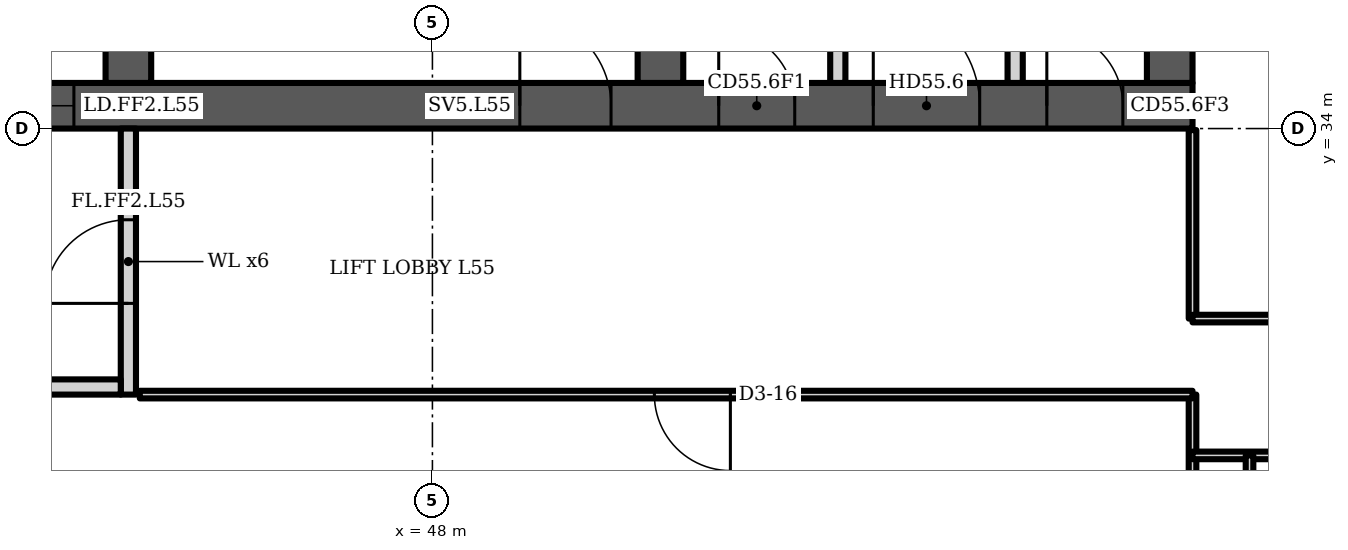
"""IFC4 building model, lengths in metres.
Left out: names, types, materials, properties, quantities, classifications, styles, units other than length and angle.
Written with IfcOpenShell. Run it as: python <this file> out.ifc"""

import sys

from ifc_helpers import new_model, si_unit, direction, frame, frame_2d, origin, place, context, subcontext, project, spatial, polyline, rectangle, outline, extrude, element, fill, save


model = new_model("IFC4")
c1 = context("Model", 3, precision=1e-05, world=origin(), true_north=direction((0.0, 1.0)))
c2 = subcontext(c1, "Body", "Model", "MODEL_VIEW")
j1 = project(units=[si_unit("LENGTHUNIT", "METRE"), si_unit("PLANEANGLEUNIT", "RADIAN")], contexts=[c1])
p1 = place(None, origin())
s1 = spatial("IfcSite", under=j1, at=p1, CompositionType="ELEMENT")
p2 = place(p1, origin())
s2 = spatial("IfcBuilding", under=s1, at=p2, CompositionType="ELEMENT")
p3 = place(p2, frame((0.0, 0.0, 221.5)))
s3 = spatial("IfcBuildingStorey", under=s2, at=p3, CompositionType="ELEMENT", Elevation=221.5)
p4 = place(p3, frame((23.0, 34.3, 0.0), z_axis=(0.0, 0.0, 1.0), x_axis=(1.0, 0.0, 0.0)))
e1 = element("IfcWall", 1, at=p4, inside=s3, PredefinedType="SHEAR", context=c2, shape_type="SweptSolid", body=[
    extrude(rectangle(XDim=35.0, YDim=0.6, at=frame_2d((17.5, 0.0))), origin(), (0.0, 0.0, 1.0), 3.6),
])
p5 = place(p4, frame((0.65, 0.0, 0.0)))
e2 = element("IfcOpeningElement", 2, at=p5, cuts=e1, PredefinedType="OPENING", context=c2, shape_type="SweptSolid", body=[
    extrude(rectangle(XDim=1.2, YDim=2.1, at=frame_2d((0.6, 1.05))), frame((0.0, 0.31, 0.0), z_axis=(0.0, -1.0, 0.0), x_axis=(1.0, 0.0, 0.0)), (0.0, 0.0, 1.0), 0.62),
])
p6 = place(p4, frame((7.717, 0.0, 0.0)))
e3 = element("IfcOpeningElement", 3, at=p6, cuts=e1, PredefinedType="OPENING", context=c2, shape_type="SweptSolid", body=[
    extrude(rectangle(XDim=1.1, YDim=2.1, at=frame_2d((0.55, 1.05))), frame((0.0, 0.31, 0.0), z_axis=(0.0, -1.0, 0.0), x_axis=(1.0, 0.0, 0.0)), (0.0, 0.0, 1.0), 0.62),
])
p7 = place(p4, frame((12.183, 0.0, 0.0)))
e4 = element("IfcOpeningElement", 4, at=p7, cuts=e1, PredefinedType="OPENING", context=c2, shape_type="SweptSolid", body=[
    extrude(rectangle(XDim=1.1, YDim=2.1, at=frame_2d((0.55, 1.05))), frame((0.0, 0.31, 0.0), z_axis=(0.0, -1.0, 0.0), x_axis=(1.0, 0.0, 0.0)), (0.0, 0.0, 1.0), 0.62),
])
p8 = place(p4, frame((9.8, 0.0, 0.0)))
e5 = element("IfcOpeningElement", 5, at=p8, cuts=e1, PredefinedType="OPENING", context=c2, shape_type="SweptSolid", body=[
    extrude(rectangle(XDim=1.4, YDim=2.1, at=frame_2d((0.7, 1.05))), frame((0.0, 0.31, 0.0), z_axis=(0.0, -1.0, 0.0), x_axis=(1.0, 0.0, 0.0)), (0.0, 0.0, 1.0), 0.62),
])
p9 = place(p4, frame((14.717, 0.0, 0.0)))
e6 = element("IfcOpeningElement", 6, at=p9, cuts=e1, PredefinedType="OPENING", context=c2, shape_type="SweptSolid", body=[
    extrude(rectangle(XDim=1.1, YDim=2.1, at=frame_2d((0.55, 1.05))), frame((0.0, 0.31, 0.0), z_axis=(0.0, -1.0, 0.0), x_axis=(1.0, 0.0, 0.0)), (0.0, 0.0, 1.0), 0.62),
])
p10 = place(p4, frame((16.95, 0.0, 0.0)))
e7 = element("IfcOpeningElement", 7, at=p10, cuts=e1, PredefinedType="OPENING", context=c2, shape_type="SweptSolid", body=[
    extrude(rectangle(XDim=1.1, YDim=2.1, at=frame_2d((0.55, 1.05))), frame((0.0, 0.31, 0.0), z_axis=(0.0, -1.0, 0.0), x_axis=(1.0, 0.0, 0.0)), (0.0, 0.0, 1.0), 0.62),
])
p11 = place(p4, frame((19.183, 0.0, 0.0)))
e8 = element("IfcOpeningElement", 8, at=p11, cuts=e1, PredefinedType="OPENING", context=c2, shape_type="SweptSolid", body=[
    extrude(rectangle(XDim=1.1, YDim=2.1, at=frame_2d((0.55, 1.05))), frame((0.0, 0.31, 0.0), z_axis=(0.0, -1.0, 0.0), x_axis=(1.0, 0.0, 0.0)), (0.0, 0.0, 1.0), 0.62),
])
p12 = place(p4, frame((26.15, 0.0, 0.0)))
e9 = element("IfcOpeningElement", 9, at=p12, cuts=e1, PredefinedType="OPENING", context=c2, shape_type="SweptSolid", body=[
    extrude(rectangle(XDim=1.2, YDim=2.1, at=frame_2d((0.6, 1.05))), frame((0.0, 0.31, 0.0), z_axis=(0.0, -1.0, 0.0), x_axis=(1.0, 0.0, 0.0)), (0.0, 0.0, 1.0), 0.62),
])
p13 = place(p4, frame((28.767, 0.0, 0.0)))
e10 = element("IfcOpeningElement", 10, at=p13, cuts=e1, PredefinedType="OPENING", context=c2, shape_type="SweptSolid", body=[
    extrude(rectangle(XDim=1.0, YDim=2.1, at=frame_2d((0.5, 1.05))), frame((0.0, 0.31, 0.0), z_axis=(0.0, -1.0, 0.0), x_axis=(1.0, 0.0, 0.0)), (0.0, 0.0, 1.0), 0.62),
])
p14 = place(p4, frame((33.083, 0.0, 0.0)))
e11 = element("IfcOpeningElement", 11, at=p14, cuts=e1, PredefinedType="OPENING", context=c2, shape_type="SweptSolid", body=[
    extrude(rectangle(XDim=1.0, YDim=2.1, at=frame_2d((0.5, 1.05))), frame((0.0, 0.31, 0.0), z_axis=(0.0, -1.0, 0.0), x_axis=(1.0, 0.0, 0.0)), (0.0, 0.0, 1.0), 0.62),
])
p15 = place(p4, frame((30.8, 0.0, 0.0)))
e12 = element("IfcOpeningElement", 12, at=p15, cuts=e1, PredefinedType="OPENING", context=c2, shape_type="SweptSolid", body=[
    extrude(rectangle(XDim=1.4, YDim=2.1, at=frame_2d((0.7, 1.05))), frame((0.0, 0.31, 0.0), z_axis=(0.0, -1.0, 0.0), x_axis=(1.0, 0.0, 0.0)), (0.0, 0.0, 1.0), 0.62),
])
p16 = place(p3, frame((44.0, 34.6, 0.0), z_axis=(0.0, 0.0, 1.0), x_axis=(0.0, 1.0, 0.0)))
e13 = element("IfcWall", 13, at=p16, inside=s3, PredefinedType="SHEAR", context=c2, shape_type="SweptSolid", body=[
    extrude(rectangle(XDim=14.784, YDim=0.6, at=frame_2d((7.392, 0.0))), origin(), (0.0, 0.0, 1.0), 3.6),
])
p17 = place(p16, frame((11.608, 0.0, 0.0)))
e14 = element("IfcOpeningElement", 14, at=p17, cuts=e13, PredefinedType="OPENING", context=c2, shape_type="SweptSolid", body=[
    extrude(rectangle(XDim=1.0, YDim=2.1, at=frame_2d((0.5, 1.05))), frame((0.0, 0.31, 0.0), z_axis=(0.0, -1.0, 0.0), x_axis=(1.0, 0.0, 0.0)), (0.0, 0.0, 1.0), 0.62),
])
p18 = place(p16, frame((3.8, 0.0, 0.0)))
e15 = element("IfcOpeningElement", 15, at=p18, cuts=e13, PredefinedType="OPENING", context=c2, shape_type="SweptSolid", body=[
    extrude(rectangle(XDim=1.1, YDim=2.1, at=frame_2d((0.55, 1.05))), frame((0.0, 0.31, 0.0), z_axis=(0.0, -1.0, 0.0), x_axis=(1.0, 0.0, 0.0)), (0.0, 0.0, 1.0), 0.62),
])
p19 = place(p3, frame((51.0, 34.6, 0.0), z_axis=(0.0, 0.0, 1.0), x_axis=(0.0, 1.0, 0.0)))
e16 = element("IfcWall", 16, at=p19, inside=s3, PredefinedType="SHEAR", context=c2, shape_type="SweptSolid", body=[
    extrude(rectangle(XDim=14.171, YDim=0.6, at=frame_2d((7.085, 0.0))), origin(), (0.0, 0.0, 1.0), 3.6),
])
p20 = place(p19, frame((3.8, 0.0, 0.0)))
e17 = element("IfcOpeningElement", 17, at=p20, cuts=e16, PredefinedType="OPENING", context=c2, shape_type="SweptSolid", body=[
    extrude(rectangle(XDim=1.1, YDim=2.1, at=frame_2d((0.55, 1.05))), frame((0.0, 0.31, 0.0), z_axis=(0.0, -1.0, 0.0), x_axis=(1.0, 0.0, 0.0)), (0.0, 0.0, 1.0), 0.62),
])
p21 = place(p3, frame((57.7, 34.6, 0.0), z_axis=(0.0, 0.0, 1.0), x_axis=(0.0, 1.0, 0.0)))
e18 = element("IfcWall", 18, at=p21, inside=s3, PredefinedType="SHEAR", context=c2, shape_type="SweptSolid", body=[
    extrude(rectangle(XDim=13.585, YDim=0.6, at=frame_2d((6.792, 0.0))), origin(), (0.0, 0.0, 1.0), 3.6),
])
p22 = place(p3, frame((0.0, 0.0, -0.0)))
e19 = element("IfcWall", 19, at=p22, inside=s3, PredefinedType="PARTITIONING", context=c2, shape_type="SweptSolid", body=[
    extrude(outline(polyline([(41.567, 37.1), (39.433, 37.1), (39.433, 34.6), (39.233, 34.6), (39.233, 37.45), (37.3, 37.45), (37.3, 37.65), (39.233, 37.65), (39.433, 37.65), (39.433, 37.3), (41.567, 37.3), (41.567, 37.35), (41.767, 37.35), (43.7, 37.35), (43.7, 37.15), (41.767, 37.15), (41.767, 34.6), (41.567, 34.6), (41.567, 37.1)])), origin(), (0.0, 0.0, 1.0), 3.2),
])
p23 = place(p3, frame((0.0, 0.0, -0.0)))
e20 = element("IfcWall", 20, at=p23, inside=s3, PredefinedType="PARTITIONING", context=c2, shape_type="SweptSolid", body=[
    extrude(outline(polyline([(53.233, 34.6), (53.233, 37.3), (53.433, 37.3), (53.433, 34.6), (53.233, 34.6)])), origin(), (0.0, 0.0, 1.0), 3.2),
])
p24 = place(p3, frame((0.0, 0.0, -0.0)))
e21 = element("IfcWall", 21, at=p24, inside=s3, PredefinedType="PARTITIONING", context=c2, shape_type="SweptSolid", body=[
    extrude(outline(polyline([(55.567, 34.6), (55.567, 37.3), (55.767, 37.3), (55.767, 34.6), (55.567, 34.6)])), origin(), (0.0, 0.0, 1.0), 3.2),
])
p25 = place(p3, frame((44.0, 30.5, 0.0), z_axis=(0.0, 0.0, 1.0), x_axis=(0.0, 1.0, 0.0)))
e22 = element("IfcWall", 22, at=p25, inside=s3, PredefinedType="PARTITIONING", context=c2, shape_type="SweptSolid", body=[
    extrude(rectangle(XDim=3.5, YDim=0.2, at=frame_2d((1.75, 0.0))), origin(), (0.0, 0.0, 1.0), 3.2),
])
p26 = place(p25, frame((1.2, 0.0, 0.0)))
e23 = element("IfcOpeningElement", 23, at=p26, cuts=e22, PredefinedType="OPENING", context=c2, shape_type="SweptSolid", body=[
    extrude(rectangle(XDim=1.1, YDim=2.1, at=frame_2d((0.55, 1.05))), frame((0.0, 0.11, 0.0), z_axis=(0.0, -1.0, 0.0), x_axis=(1.0, 0.0, 0.0)), (0.0, 0.0, 1.0), 0.22),
])
p27 = place(p3, frame((41.1, 30.6, 0.0), z_axis=(0.0, 0.0, 1.0), x_axis=(1.0, 0.0, 0.0)))
e24 = element("IfcWall", 24, at=p27, inside=s3, PredefinedType="PARTITIONING", context=c2, shape_type="SweptSolid", body=[
    extrude(rectangle(XDim=2.8, YDim=0.2, at=frame_2d((1.4, 0.0))), origin(), (0.0, 0.0, 1.0), 3.2),
])
p28 = place(p3, frame((58.0, 17.0, 0.0), z_axis=(0.0, 0.0, 1.0), x_axis=(0.0, 1.0, 0.0)))
e25 = element("IfcWall", 25, at=p28, inside=s3, PredefinedType="PARTITIONING", context=c2, shape_type="SweptSolid", body=[
    extrude(rectangle(XDim=13.5, YDim=0.1, at=frame_2d((6.75, 0.0))), origin(), (0.0, 0.0, 1.0), 3.2),
])
p29 = place(p3, frame((58.0, 29.7, 0.0), z_axis=(0.0, 0.0, 1.0), x_axis=(1.0, 0.0, 0.0)))
e26 = element("IfcWall", 26, at=p29, inside=s3, PredefinedType="PARTITIONING", context=c2, shape_type="SweptSolid", body=[
    extrude(rectangle(XDim=3.58, YDim=0.1, at=frame_2d((1.79, 0.0))), origin(), (0.0, 0.0, 1.0), 3.2),
])
p30 = place(p3, frame((58.0, 31.5, 0.0), z_axis=(0.0, 0.0, 1.0), x_axis=(0.0, 1.0, 0.0)))
e27 = element("IfcWall", 27, at=p30, inside=s3, PredefinedType="PARTITIONING", context=c2, shape_type="SweptSolid", body=[
    extrude(rectangle(XDim=2.48, YDim=0.1, at=frame_2d((1.24, 0.0))), origin(), (0.0, 0.0, 1.0), 3.2),
])
p31 = place(p3, frame((58.0, 31.5, 0.0), z_axis=(0.0, 0.0, 1.0), x_axis=(1.0, 0.0, 0.0)))
e28 = element("IfcWall", 28, at=p31, inside=s3, PredefinedType="PARTITIONING", context=c2, shape_type="SweptSolid", body=[
    extrude(rectangle(XDim=5.38, YDim=0.1, at=frame_2d((2.69, 0.0))), origin(), (0.0, 0.0, 1.0), 3.2),
])
p32 = place(p31, frame((4.135, 0.0, 0.0)))
e29 = element("IfcOpeningElement", 29, at=p32, cuts=e28, PredefinedType="OPENING", context=c2, shape_type="SweptSolid", body=[
    extrude(rectangle(XDim=1.0, YDim=2.1, at=frame_2d((0.5, 1.05))), frame((0.0, 0.06, 0.0), z_axis=(0.0, -1.0, 0.0), x_axis=(1.0, 0.0, 0.0)), (0.0, 0.0, 1.0), 0.12),
])
p33 = place(p3, frame((58.75, 23.35, 0.0), z_axis=(0.0, 0.0, 1.0), x_axis=(0.0, 1.0, 0.0)))
e30 = element("IfcWall", 30, at=p33, inside=s3, PredefinedType="PARTITIONING", context=c2, shape_type="SweptSolid", body=[
    extrude(rectangle(XDim=6.35, YDim=0.1, at=frame_2d((3.175, 0.0))), origin(), (0.0, 0.0, 1.0), 3.2),
])
p34 = place(p3, frame((44.15, 30.5, 0.0), z_axis=(0.0, 0.0, 1.0), x_axis=(1.0, 0.0, 0.0)))
e31 = element("IfcWall", 31, at=p34, inside=s3, PredefinedType="PARTITIONING", context=c2, shape_type="SweptSolid", body=[
    extrude(rectangle(XDim=13.85, YDim=0.1, at=frame_2d((6.925, 0.0))), origin(), (0.0, 0.0, 1.0), 3.2),
])
p35 = place(p34, frame((6.77, 0.0, 0.0)))
e32 = element("IfcOpeningElement", 32, at=p35, cuts=e31, PredefinedType="OPENING", context=c2, shape_type="SweptSolid", body=[
    extrude(rectangle(XDim=1.0, YDim=2.1, at=frame_2d((0.5, 1.05))), frame((0.0, 0.06, 0.0), z_axis=(0.0, -1.0, 0.0), x_axis=(1.0, 0.0, 0.0)), (0.0, 0.0, 1.0), 0.12),
])
p36 = place(p11, origin())
e33 = element("IfcDoor", 33, at=p36, inside=s3, OperationType="DOUBLE_DOOR_SLIDING", PredefinedType="DOOR", context=c2, shape_type="SweptSolid", body=[
    extrude(rectangle(XDim=1.1, YDim=2.1, at=frame_2d((0.55, 1.05))), frame((0.0, 0.025, 0.0), z_axis=(0.0, -1.0, 0.0), x_axis=(1.0, 0.0, 0.0)), (0.0, 0.0, 1.0), 0.05),
])
fill(e8, e33)
p37 = place(p12, origin())
e34 = element("IfcDoor", 34, at=p37, inside=s3, OperationType="SINGLE_SWING_LEFT", PredefinedType="DOOR", context=c2, shape_type="SweptSolid", body=[
    extrude(rectangle(XDim=1.2, YDim=2.1, at=frame_2d((0.6, 1.05))), frame((0.0, 0.025, 0.0), z_axis=(0.0, -1.0, 0.0), x_axis=(1.0, 0.0, 0.0)), (0.0, 0.0, 1.0), 0.05),
])
fill(e9, e34)
p38 = place(p13, origin())
e35 = element("IfcDoor", 35, at=p38, inside=s3, OperationType="SINGLE_SWING_LEFT", PredefinedType="DOOR", context=c2, shape_type="SweptSolid", body=[
    extrude(rectangle(XDim=1.0, YDim=2.1, at=frame_2d((0.5, 1.05))), frame((0.0, 0.025, 0.0), z_axis=(0.0, -1.0, 0.0), x_axis=(1.0, 0.0, 0.0)), (0.0, 0.0, 1.0), 0.05),
])
fill(e10, e35)
p39 = place(p14, origin())
e36 = element("IfcDoor", 36, at=p39, inside=s3, OperationType="SINGLE_SWING_LEFT", PredefinedType="DOOR", context=c2, shape_type="SweptSolid", body=[
    extrude(rectangle(XDim=1.0, YDim=2.1, at=frame_2d((0.5, 1.05))), frame((0.0, 0.025, 0.0), z_axis=(0.0, -1.0, 0.0), x_axis=(1.0, 0.0, 0.0)), (0.0, 0.0, 1.0), 0.05),
])
fill(e11, e36)
p40 = place(p15, origin())
e37 = element("IfcDoor", 37, at=p40, inside=s3, OperationType="DOUBLE_DOOR_SINGLE_SWING", PredefinedType="DOOR", context=c2, shape_type="SweptSolid", body=[
    extrude(rectangle(XDim=1.4, YDim=2.1, at=frame_2d((0.7, 1.05))), frame((0.0, 0.025, 0.0), z_axis=(0.0, -1.0, 0.0), x_axis=(1.0, 0.0, 0.0)), (0.0, 0.0, 1.0), 0.05),
])
fill(e12, e37)
p41 = place(p26, origin())
e38 = element("IfcDoor", 38, at=p41, inside=s3, OperationType="SINGLE_SWING_LEFT", PredefinedType="DOOR", context=c2, shape_type="SweptSolid", body=[
    extrude(rectangle(XDim=1.1, YDim=2.1, at=frame_2d((0.55, 1.05))), frame((0.0, 0.025, 0.0), z_axis=(0.0, -1.0, 0.0), x_axis=(1.0, 0.0, 0.0)), (0.0, 0.0, 1.0), 0.05),
])
fill(e23, e38)
p42 = place(p35, origin())
e39 = element("IfcDoor", 39, at=p42, inside=s3, OperationType="SINGLE_SWING_RIGHT", PredefinedType="DOOR", context=c2, shape_type="SweptSolid", body=[
    extrude(rectangle(XDim=1.0, YDim=2.1, at=frame_2d((0.5, 1.05))), frame((0.0, 0.025, 0.0), z_axis=(0.0, -1.0, 0.0), x_axis=(1.0, 0.0, 0.0)), (0.0, 0.0, 1.0), 0.05),
])
fill(e32, e39)
save(model, sys.argv[1])
